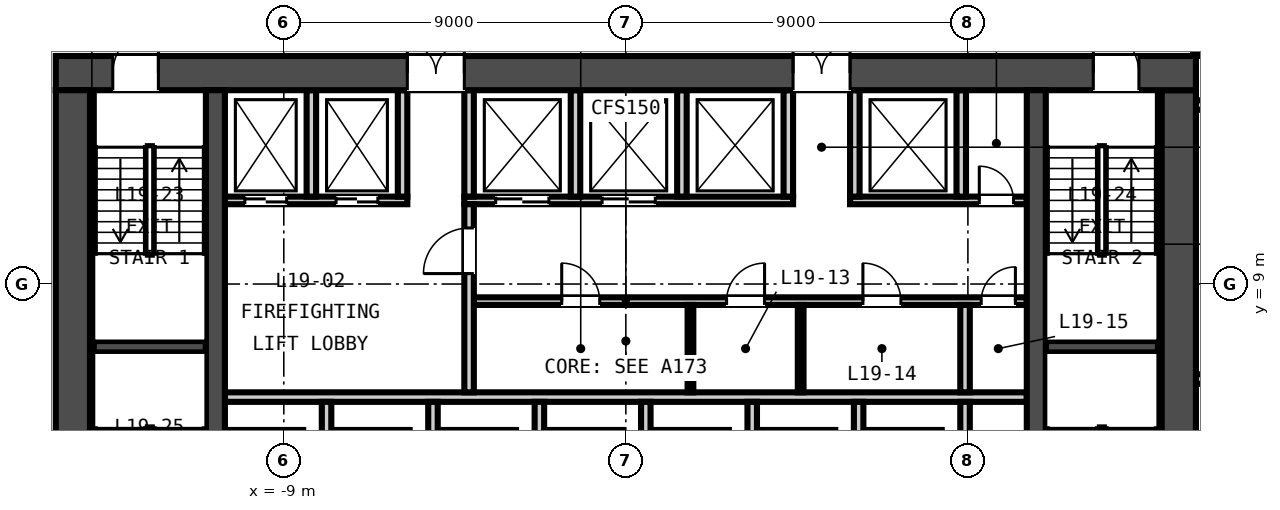
"""IFC4 building model, lengths in metres.
Left out: names, types, materials, properties, quantities, classifications, styles, units other than length and angle.
Written with IfcOpenShell. Run it as: python <this file> out.ifc"""

import sys

from ifc_helpers import new_model, si_unit, direction, frame, frame_2d, origin, place, context, subcontext, project, spatial, rectangle, extrude, element, fill, save


model = new_model("IFC4")
c1 = context("Model", 3, precision=1e-05, world=origin(), true_north=direction((0.0, 1.0)))
c2 = subcontext(c1, "Body", "Model", "MODEL_VIEW")
j1 = project(units=[si_unit("LENGTHUNIT", "METRE"), si_unit("PLANEANGLEUNIT", "RADIAN")], contexts=[c1])
p1 = place(None, origin())
s1 = spatial("IfcSite", under=j1, at=p1, CompositionType="ELEMENT")
p2 = place(p1, origin())
s2 = spatial("IfcBuilding", under=s1, at=p2, CompositionType="ELEMENT")
p3 = place(p2, frame((0.0, 0.0, 84.3)))
s3 = spatial("IfcBuildingStorey", under=s2, at=p3, CompositionType="ELEMENT", Elevation=84.3)
p4 = place(p3, frame((-15.0, 14.55, -0.15), z_axis=(0.0, 0.0, 1.0), x_axis=(1.0, 0.0, 0.0)))
e1 = element("IfcWall", 1, at=p4, inside=s3, PredefinedType="SOLIDWALL", context=c2, shape_type="SweptSolid", body=[
    extrude(rectangle(XDim=30.0, YDim=0.9, at=frame_2d((15.0, 0.0))), origin(), (0.0, 0.0, 1.0), 3.65),
])
p5 = place(p4, frame((9.25, 0.0, 0.15)))
e2 = element("IfcOpeningElement", 2, at=p5, cuts=e1, PredefinedType="OPENING", context=c2, shape_type="SweptSolid", body=[
    extrude(rectangle(XDim=1.5, YDim=2.1, at=frame_2d((0.75, 1.05))), frame((0.0, 0.46, 0.0), z_axis=(0.0, -1.0, 0.0), x_axis=(1.0, 0.0, 0.0)), (0.0, 0.0, 1.0), 0.92),
])
p6 = place(p4, frame((19.4, 0.0, 0.15)))
e3 = element("IfcOpeningElement", 3, at=p6, cuts=e1, PredefinedType="OPENING", context=c2, shape_type="SweptSolid", body=[
    extrude(rectangle(XDim=1.5, YDim=2.1, at=frame_2d((0.75, 1.05))), frame((0.0, 0.46, 0.0), z_axis=(0.0, -1.0, 0.0), x_axis=(1.0, 0.0, 0.0)), (0.0, 0.0, 1.0), 0.92),
])
p7 = place(p4, frame((1.5, 0.0, 0.15)))
e4 = element("IfcOpeningElement", 4, at=p7, cuts=e1, PredefinedType="OPENING", context=c2, shape_type="SweptSolid", body=[
    extrude(rectangle(XDim=1.2, YDim=2.1, at=frame_2d((0.6, 1.05))), frame((0.0, 0.46, 0.0), z_axis=(0.0, -1.0, 0.0), x_axis=(1.0, 0.0, 0.0)), (0.0, 0.0, 1.0), 0.92),
])
p8 = place(p4, frame((27.3, 0.0, 0.15)))
e5 = element("IfcOpeningElement", 5, at=p8, cuts=e1, PredefinedType="OPENING", context=c2, shape_type="SweptSolid", body=[
    extrude(rectangle(XDim=1.2, YDim=2.1, at=frame_2d((0.6, 1.05))), frame((0.0, 0.46, 0.0), z_axis=(0.0, -1.0, 0.0), x_axis=(1.0, 0.0, 0.0)), (0.0, 0.0, 1.0), 0.92),
])
for number, where, z_axis, x_axis in (
    (6, (-14.55, 0.9, -0.15), (0.0, 0.0, 1.0), (0.0, 1.0, 0.0)),
    (7, (14.55, 0.9, -0.15), (0.0, 0.0, 1.0), (0.0, 1.0, 0.0)),
):
    element("IfcWall", number, at=place(p3, frame(where, z_axis=z_axis, x_axis=x_axis)), inside=s3, PredefinedType="SOLIDWALL", context=c2, shape_type="SweptSolid", body=[
        extrude(rectangle(XDim=13.2, YDim=0.9, at=frame_2d((6.6, 0.0))), origin(), (0.0, 0.0, 1.0), 3.65),
    ])
for number, where, z_axis, x_axis in (
    (8, (-10.8, 0.9, -0.15), (0.0, 0.0, 1.0), (0.0, 1.0, 0.0)),
    (9, (10.8, 0.9, -0.15), (0.0, 0.0, 1.0), (0.0, 1.0, 0.0)),
):
    element("IfcWall", number, at=place(p3, frame(where, z_axis=z_axis, x_axis=x_axis)), inside=s3, PredefinedType="SOLIDWALL", context=c2, shape_type="SweptSolid", body=[
        extrude(rectangle(XDim=13.2, YDim=0.5, at=frame_2d((6.6, 0.0))), origin(), (0.0, 0.0, 1.0), 3.65),
    ])
p9 = place(p3, frame((-10.55, 6.025, 0.0), z_axis=(0.0, 0.0, 1.0), x_axis=(1.0, 0.0, 0.0)))
e10 = element("IfcWall", 10, at=p9, inside=s3, PredefinedType="PARTITIONING", context=c2, shape_type="SweptSolid", body=[
    extrude(rectangle(XDim=21.1, YDim=0.25, at=frame_2d((10.55, 0.0))), origin(), (0.0, 0.0, 1.0), 3.5),
])
p10 = place(p3, frame((-4.125, 8.55, 0.0), z_axis=(0.0, 0.0, 1.0), x_axis=(1.0, 0.0, 0.0)))
e11 = element("IfcWall", 11, at=p10, inside=s3, PredefinedType="PARTITIONING", context=c2, shape_type="SweptSolid", body=[
    extrude(rectangle(XDim=14.675, YDim=0.2, at=frame_2d((7.337, 0.0))), origin(), (0.0, 0.0, 1.0), 3.5),
])
p11 = place(p10, frame((2.438, 0.0, 0.0)))
e12 = element("IfcOpeningElement", 12, at=p11, cuts=e11, PredefinedType="OPENING", context=c2, shape_type="SweptSolid", body=[
    extrude(rectangle(XDim=1.0, YDim=2.1, at=frame_2d((0.5, 1.05))), frame((0.0, 0.11, 0.0), z_axis=(0.0, -1.0, 0.0), x_axis=(1.0, 0.0, 0.0)), (0.0, 0.0, 1.0), 0.22),
])
p12 = place(p10, frame((6.775, 0.0, 0.0)))
e13 = element("IfcOpeningElement", 13, at=p12, cuts=e11, PredefinedType="OPENING", context=c2, shape_type="SweptSolid", body=[
    extrude(rectangle(XDim=1.0, YDim=2.1, at=frame_2d((0.5, 1.05))), frame((0.0, 0.11, 0.0), z_axis=(0.0, -1.0, 0.0), x_axis=(1.0, 0.0, 0.0)), (0.0, 0.0, 1.0), 0.22),
])
p13 = place(p10, frame((10.363, 0.0, 0.0)))
e14 = element("IfcOpeningElement", 14, at=p13, cuts=e11, PredefinedType="OPENING", context=c2, shape_type="SweptSolid", body=[
    extrude(rectangle(XDim=1.0, YDim=2.1, at=frame_2d((0.5, 1.05))), frame((0.0, 0.11, 0.0), z_axis=(0.0, -1.0, 0.0), x_axis=(1.0, 0.0, 0.0)), (0.0, 0.0, 1.0), 0.22),
])
p14 = place(p10, frame((13.475, 0.0, 0.0)))
e15 = element("IfcOpeningElement", 15, at=p14, cuts=e11, PredefinedType="OPENING", context=c2, shape_type="SweptSolid", body=[
    extrude(rectangle(XDim=0.9, YDim=2.1, at=frame_2d((0.45, 1.05))), frame((0.0, 0.11, 0.0), z_axis=(0.0, -1.0, 0.0), x_axis=(1.0, 0.0, 0.0)), (0.0, 0.0, 1.0), 0.22),
])
p15 = place(p3, frame((-10.55, 11.2, 0.0), z_axis=(0.0, 0.0, 1.0), x_axis=(1.0, 0.0, 0.0)))
e16 = element("IfcWall", 16, at=p15, inside=s3, PredefinedType="PARTITIONING", context=c2, shape_type="SweptSolid", body=[
    extrude(rectangle(XDim=4.8, YDim=0.2, at=frame_2d((2.4, 0.0))), origin(), (0.0, 0.0, 1.0), 3.5),
])
p16 = place(p15, frame((0.525, 0.0, 0.0)))
e17 = element("IfcOpeningElement", 17, at=p16, cuts=e16, PredefinedType="OPENING", context=c2, shape_type="SweptSolid", body=[
    extrude(rectangle(XDim=1.1, YDim=2.1, at=frame_2d((0.55, 1.05))), frame((0.0, 0.11, 0.0), z_axis=(0.0, -1.0, 0.0), x_axis=(1.0, 0.0, 0.0)), (0.0, 0.0, 1.0), 0.22),
])
p17 = place(p15, frame((2.925, 0.0, 0.0)))
e18 = element("IfcOpeningElement", 18, at=p17, cuts=e16, PredefinedType="OPENING", context=c2, shape_type="SweptSolid", body=[
    extrude(rectangle(XDim=1.1, YDim=2.1, at=frame_2d((0.55, 1.05))), frame((0.0, 0.11, 0.0), z_axis=(0.0, -1.0, 0.0), x_axis=(1.0, 0.0, 0.0)), (0.0, 0.0, 1.0), 0.22),
])
p18 = place(p3, frame((-4.25, 11.2, 0.0), z_axis=(0.0, 0.0, 1.0), x_axis=(1.0, 0.0, 0.0)))
e19 = element("IfcWall", 19, at=p18, inside=s3, PredefinedType="PARTITIONING", context=c2, shape_type="SweptSolid", body=[
    extrude(rectangle(XDim=8.65, YDim=0.2, at=frame_2d((4.325, 0.0))), origin(), (0.0, 0.0, 1.0), 3.5),
])
p19 = place(p18, frame((0.825, 0.0, 0.0)))
e20 = element("IfcOpeningElement", 20, at=p19, cuts=e19, PredefinedType="OPENING", context=c2, shape_type="SweptSolid", body=[
    extrude(rectangle(XDim=1.4, YDim=2.1, at=frame_2d((0.7, 1.05))), frame((0.0, 0.11, 0.0), z_axis=(0.0, -1.0, 0.0), x_axis=(1.0, 0.0, 0.0)), (0.0, 0.0, 1.0), 0.22),
])
p20 = place(p18, frame((3.625, 0.0, 0.0)))
e21 = element("IfcOpeningElement", 21, at=p20, cuts=e19, PredefinedType="OPENING", context=c2, shape_type="SweptSolid", body=[
    extrude(rectangle(XDim=1.4, YDim=2.1, at=frame_2d((0.7, 1.05))), frame((0.0, 0.11, 0.0), z_axis=(0.0, -1.0, 0.0), x_axis=(1.0, 0.0, 0.0)), (0.0, 0.0, 1.0), 0.22),
])
p21 = place(p3, frame((5.9, 11.2, 0.0), z_axis=(0.0, 0.0, 1.0), x_axis=(1.0, 0.0, 0.0)))
e22 = element("IfcWall", 22, at=p21, inside=s3, PredefinedType="PARTITIONING", context=c2, shape_type="SweptSolid", body=[
    extrude(rectangle(XDim=4.65, YDim=0.2, at=frame_2d((2.325, 0.0))), origin(), (0.0, 0.0, 1.0), 3.5),
])
p22 = place(p21, frame((3.4, 0.0, 0.0)))
e23 = element("IfcOpeningElement", 23, at=p22, cuts=e22, PredefinedType="OPENING", context=c2, shape_type="SweptSolid", body=[
    extrude(rectangle(XDim=0.9, YDim=2.1, at=frame_2d((0.45, 1.05))), frame((0.0, 0.11, 0.0), z_axis=(0.0, -1.0, 0.0), x_axis=(1.0, 0.0, 0.0)), (0.0, 0.0, 1.0), 0.22),
])
p23 = place(p3, frame((-4.125, 6.15, 0.0), z_axis=(0.0, 0.0, 1.0), x_axis=(0.0, 1.0, 0.0)))
e24 = element("IfcWall", 24, at=p23, inside=s3, PredefinedType="PARTITIONING", context=c2, shape_type="SweptSolid", body=[
    extrude(rectangle(XDim=4.95, YDim=0.25, at=frame_2d((2.475, 0.0))), origin(), (0.0, 0.0, 1.0), 3.5),
])
p24 = place(p23, frame((3.125, 0.0, 0.0)))
e25 = element("IfcOpeningElement", 25, at=p24, cuts=e24, PredefinedType="OPENING", context=c2, shape_type="SweptSolid", body=[
    extrude(rectangle(XDim=1.2, YDim=2.1, at=frame_2d((0.6, 1.05))), frame((0.0, 0.135, 0.0), z_axis=(0.0, -1.0, 0.0), x_axis=(1.0, 0.0, 0.0)), (0.0, 0.0, 1.0), 0.27),
])
for number, where, z_axis, x_axis in (
    (26, (-7.875, 3.6, 0.0), (0.0, 0.0, 1.0), (0.0, 1.0, 0.0)),
    (27, (-5.075, 3.6, 0.0), (0.0, 0.0, 1.0), (0.0, 1.0, 0.0)),
    (28, (-2.275, 3.6, 0.0), (0.0, 0.0, 1.0), (0.0, 1.0, 0.0)),
    (29, (0.525, 3.6, 0.0), (0.0, 0.0, 1.0), (0.0, 1.0, 0.0)),
    (30, (3.325, 3.6, 0.0), (0.0, 0.0, 1.0), (0.0, 1.0, 0.0)),
    (31, (6.125, 3.6, 0.0), (0.0, 0.0, 1.0), (0.0, 1.0, 0.0)),
    (32, (8.925, 3.6, 0.0), (0.0, 0.0, 1.0), (0.0, 1.0, 0.0)),
):
    element("IfcWall", number, at=place(p3, frame(where, z_axis=z_axis, x_axis=x_axis)), inside=s3, PredefinedType="PARTITIONING", context=c2, shape_type="SweptSolid", body=[
        extrude(rectangle(XDim=2.3, YDim=0.25, at=frame_2d((1.15, 0.0))), origin(), (0.0, 0.0, 1.0), 3.5),
    ])
for number, where, z_axis, x_axis in (
    (33, (1.7, 6.15, 0.0), (0.0, 0.0, 1.0), (0.0, 1.0, 0.0)),
    (34, (4.6, 6.15, 0.0), (0.0, 0.0, 1.0), (0.0, 1.0, 0.0)),
):
    element("IfcWall", number, at=place(p3, frame(where, z_axis=z_axis, x_axis=x_axis)), inside=s3, PredefinedType="PARTITIONING", context=c2, shape_type="SweptSolid", body=[
        extrude(rectangle(XDim=2.3, YDim=0.15, at=frame_2d((1.15, 0.0))), origin(), (0.0, 0.0, 1.0), 3.5),
    ])
p25 = place(p3, frame((8.925, 6.15, 0.0), z_axis=(0.0, 0.0, 1.0), x_axis=(0.0, 1.0, 0.0)))
e35 = element("IfcWall", 35, at=p25, inside=s3, PredefinedType="PARTITIONING", context=c2, shape_type="SweptSolid", body=[
    extrude(rectangle(XDim=2.3, YDim=0.25, at=frame_2d((1.15, 0.0))), origin(), (0.0, 0.0, 1.0), 3.5),
])
for number, where, z_axis, x_axis in (
    (36, (-8.275, 11.3, 0.0), (0.0, 0.0, 1.0), (0.0, 1.0, 0.0)),
    (37, (-5.875, 11.3, 0.0), (0.0, 0.0, 1.0), (0.0, 1.0, 0.0)),
    (38, (-4.125, 11.3, 0.0), (0.0, 0.0, 1.0), (0.0, 1.0, 0.0)),
    (39, (-1.325, 11.3, 0.0), (0.0, 0.0, 1.0), (0.0, 1.0, 0.0)),
    (40, (1.475, 11.3, 0.0), (0.0, 0.0, 1.0), (0.0, 1.0, 0.0)),
    (41, (4.275, 11.3, 0.0), (0.0, 0.0, 1.0), (0.0, 1.0, 0.0)),
    (42, (6.025, 11.3, 0.0), (0.0, 0.0, 1.0), (0.0, 1.0, 0.0)),
    (43, (8.825, 11.3, 0.0), (0.0, 0.0, 1.0), (0.0, 1.0, 0.0)),
):
    element("IfcWall", number, at=place(p3, frame(where, z_axis=z_axis, x_axis=x_axis)), inside=s3, PredefinedType="PARTITIONING", context=c2, shape_type="SweptSolid", body=[
        extrude(rectangle(XDim=2.8, YDim=0.25, at=frame_2d((1.4, 0.0))), origin(), (0.0, 0.0, 1.0), 3.5),
    ])
p26 = place(p3, frame((-14.0, 7.35, 0.0), z_axis=(0.0, 0.0, 1.0), x_axis=(1.0, 0.0, 0.0)))
e44 = element("IfcWall", 44, at=p26, inside=s3, PredefinedType="SOLIDWALL", context=c2, shape_type="SweptSolid", body=[
    extrude(rectangle(XDim=2.95, YDim=0.3, at=frame_2d((1.475, 0.0))), origin(), (0.0, 0.0, 1.0), 3.5),
])
p27 = place(p3, frame((-14.05, 0.9, 0.0), z_axis=(0.0, 0.0, 1.0), x_axis=(0.0, 1.0, 0.0)))
e45 = element("IfcWall", 45, at=p27, inside=s3, PredefinedType="SOLIDWALL", context=c2, shape_type="SweptSolid", body=[
    extrude(rectangle(XDim=13.2, YDim=0.1, at=frame_2d((6.6, 0.0))), origin(), (0.0, 0.0, 1.0), 3.5),
])
p28 = place(p3, frame((11.05, 7.35, 0.0), z_axis=(0.0, 0.0, 1.0), x_axis=(1.0, 0.0, 0.0)))
e46 = element("IfcWall", 46, at=p28, inside=s3, PredefinedType="SOLIDWALL", context=c2, shape_type="SweptSolid", body=[
    extrude(rectangle(XDim=2.95, YDim=0.3, at=frame_2d((1.475, 0.0))), origin(), (0.0, 0.0, 1.0), 3.5),
])
p29 = place(p3, frame((14.05, 0.9, 0.0), z_axis=(0.0, 0.0, 1.0), x_axis=(0.0, 1.0, 0.0)))
e47 = element("IfcWall", 47, at=p29, inside=s3, PredefinedType="SOLIDWALL", context=c2, shape_type="SweptSolid", body=[
    extrude(rectangle(XDim=13.2, YDim=0.1, at=frame_2d((6.6, 0.0))), origin(), (0.0, 0.0, 1.0), 3.5),
])
p30 = place(p3, frame((15.0, 16.967, 0.0), z_axis=(0.0, 0.0, 1.0), x_axis=(0.0, -1.0, 0.0)))
e48 = element("IfcWall", 48, at=p30, inside=s3, PredefinedType="PARTITIONING", context=c2, shape_type="SweptSolid", body=[
    extrude(rectangle(XDim=1.967, YDim=0.15, at=frame_2d((0.983, 0.0))), origin(), (0.0, 0.0, 1.0), 2.741),
])
p31 = place(p30, frame((0.483, 0.0, 0.0)))
e49 = element("IfcOpeningElement", 49, at=p31, cuts=e48, PredefinedType="OPENING", context=c2, shape_type="SweptSolid", body=[
    extrude(rectangle(XDim=1.0, YDim=2.1, at=frame_2d((0.5, 1.05))), frame((0.0, 0.085, 0.0), z_axis=(0.0, -1.0, 0.0), x_axis=(1.0, 0.0, 0.0)), (0.0, 0.0, 1.0), 0.17),
])
p32 = place(p3, frame((15.0, 13.709, 0.0), z_axis=(0.0, 0.0, 1.0), x_axis=(1.0, 0.0, 0.0)))
e50 = element("IfcWall", 50, at=p32, inside=s3, PredefinedType="PARTITIONING", context=c2, shape_type="SweptSolid", body=[
    extrude(rectangle(XDim=13.668, YDim=0.25, at=frame_2d((6.834, 0.0))), origin(), (0.0, 0.0, 1.0), 2.741),
])
p33 = place(p3, frame((15.0, 6.5, 0.0), z_axis=(0.0, 0.0, 1.0), x_axis=(1.0, 0.0, 0.0)))
e51 = element("IfcWall", 51, at=p33, inside=s3, PredefinedType="PARTITIONING", context=c2, shape_type="SweptSolid", body=[
    extrude(rectangle(XDim=3.275, YDim=0.25, at=frame_2d((1.637, 0.0))), origin(), (0.0, 0.0, 1.0), 2.741),
])
p34 = place(p24, origin())
e52 = element("IfcDoor", 52, at=p34, inside=s3, OperationType="SINGLE_SWING_LEFT", PredefinedType="DOOR", context=c2, shape_type="SweptSolid", body=[
    extrude(rectangle(XDim=1.2, YDim=2.1, at=frame_2d((0.6, 1.05))), frame((0.0, 0.025, 0.0), z_axis=(0.0, -1.0, 0.0), x_axis=(1.0, 0.0, 0.0)), (0.0, 0.0, 1.0), 0.05),
])
fill(e25, e52)
p35 = place(p11, origin())
e53 = element("IfcDoor", 53, at=p35, inside=s3, OperationType="SINGLE_SWING_LEFT", PredefinedType="DOOR", context=c2, shape_type="SweptSolid", body=[
    extrude(rectangle(XDim=1.0, YDim=2.1, at=frame_2d((0.5, 1.05))), frame((0.0, 0.025, 0.0), z_axis=(0.0, -1.0, 0.0), x_axis=(1.0, 0.0, 0.0)), (0.0, 0.0, 1.0), 0.05),
])
fill(e12, e53)
p36 = place(p12, origin())
e54 = element("IfcDoor", 54, at=p36, inside=s3, OperationType="SINGLE_SWING_RIGHT", PredefinedType="DOOR", context=c2, shape_type="SweptSolid", body=[
    extrude(rectangle(XDim=1.0, YDim=2.1, at=frame_2d((0.5, 1.05))), frame((0.0, 0.025, 0.0), z_axis=(0.0, -1.0, 0.0), x_axis=(1.0, 0.0, 0.0)), (0.0, 0.0, 1.0), 0.05),
])
fill(e13, e54)
p37 = place(p13, origin())
e55 = element("IfcDoor", 55, at=p37, inside=s3, OperationType="SINGLE_SWING_LEFT", PredefinedType="DOOR", context=c2, shape_type="SweptSolid", body=[
    extrude(rectangle(XDim=1.0, YDim=2.1, at=frame_2d((0.5, 1.05))), frame((0.0, 0.025, 0.0), z_axis=(0.0, -1.0, 0.0), x_axis=(1.0, 0.0, 0.0)), (0.0, 0.0, 1.0), 0.05),
])
fill(e14, e55)
p38 = place(p14, origin())
e56 = element("IfcDoor", 56, at=p38, inside=s3, OperationType="SINGLE_SWING_RIGHT", PredefinedType="DOOR", context=c2, shape_type="SweptSolid", body=[
    extrude(rectangle(XDim=0.9, YDim=2.1, at=frame_2d((0.45, 1.05))), frame((0.0, 0.025, 0.0), z_axis=(0.0, -1.0, 0.0), x_axis=(1.0, 0.0, 0.0)), (0.0, 0.0, 1.0), 0.05),
])
fill(e15, e56)
p39 = place(p16, origin())
e57 = element("IfcDoor", 57, at=p39, inside=s3, OperationType="DOUBLE_DOOR_SLIDING", PredefinedType="DOOR", context=c2, shape_type="SweptSolid", body=[
    extrude(rectangle(XDim=1.1, YDim=2.1, at=frame_2d((0.55, 1.05))), frame((0.0, 0.025, 0.0), z_axis=(0.0, -1.0, 0.0), x_axis=(1.0, 0.0, 0.0)), (0.0, 0.0, 1.0), 0.05),
])
fill(e17, e57)
p40 = place(p17, origin())
e58 = element("IfcDoor", 58, at=p40, inside=s3, OperationType="DOUBLE_DOOR_SLIDING", PredefinedType="DOOR", context=c2, shape_type="SweptSolid", body=[
    extrude(rectangle(XDim=1.1, YDim=2.1, at=frame_2d((0.55, 1.05))), frame((0.0, 0.025, 0.0), z_axis=(0.0, -1.0, 0.0), x_axis=(1.0, 0.0, 0.0)), (0.0, 0.0, 1.0), 0.05),
])
fill(e18, e58)
p41 = place(p19, origin())
e59 = element("IfcDoor", 59, at=p41, inside=s3, OperationType="DOUBLE_DOOR_SLIDING", PredefinedType="DOOR", context=c2, shape_type="SweptSolid", body=[
    extrude(rectangle(XDim=1.4, YDim=2.1, at=frame_2d((0.7, 1.05))), frame((0.0, 0.025, 0.0), z_axis=(0.0, -1.0, 0.0), x_axis=(1.0, 0.0, 0.0)), (0.0, 0.0, 1.0), 0.05),
])
fill(e20, e59)
p42 = place(p20, origin())
e60 = element("IfcDoor", 60, at=p42, inside=s3, OperationType="DOUBLE_DOOR_SLIDING", PredefinedType="DOOR", context=c2, shape_type="SweptSolid", body=[
    extrude(rectangle(XDim=1.4, YDim=2.1, at=frame_2d((0.7, 1.05))), frame((0.0, 0.025, 0.0), z_axis=(0.0, -1.0, 0.0), x_axis=(1.0, 0.0, 0.0)), (0.0, 0.0, 1.0), 0.05),
])
fill(e21, e60)
p43 = place(p22, origin())
e61 = element("IfcDoor", 61, at=p43, inside=s3, OperationType="SINGLE_SWING_LEFT", PredefinedType="DOOR", context=c2, shape_type="SweptSolid", body=[
    extrude(rectangle(XDim=0.9, YDim=2.1, at=frame_2d((0.45, 1.05))), frame((0.0, 0.025, 0.0), z_axis=(0.0, -1.0, 0.0), x_axis=(1.0, 0.0, 0.0)), (0.0, 0.0, 1.0), 0.05),
])
fill(e23, e61)
p44 = place(p5, origin())
e62 = element("IfcDoor", 62, at=p44, inside=s3, OperationType="DOUBLE_DOOR_SINGLE_SWING", PredefinedType="DOOR", context=c2, shape_type="SweptSolid", body=[
    extrude(rectangle(XDim=1.5, YDim=2.1, at=frame_2d((0.75, 1.05))), frame((0.0, 0.025, 0.0), z_axis=(0.0, -1.0, 0.0), x_axis=(1.0, 0.0, 0.0)), (0.0, 0.0, 1.0), 0.05),
])
fill(e2, e62)
p45 = place(p6, origin())
e63 = element("IfcDoor", 63, at=p45, inside=s3, OperationType="DOUBLE_DOOR_SINGLE_SWING", PredefinedType="DOOR", context=c2, shape_type="SweptSolid", body=[
    extrude(rectangle(XDim=1.5, YDim=2.1, at=frame_2d((0.75, 1.05))), frame((0.0, 0.025, 0.0), z_axis=(0.0, -1.0, 0.0), x_axis=(1.0, 0.0, 0.0)), (0.0, 0.0, 1.0), 0.05),
])
fill(e3, e63)
p46 = place(p7, origin())
e64 = element("IfcDoor", 64, at=p46, inside=s3, OperationType="SINGLE_SWING_RIGHT", PredefinedType="DOOR", context=c2, shape_type="SweptSolid", body=[
    extrude(rectangle(XDim=1.2, YDim=2.1, at=frame_2d((0.6, 1.05))), frame((0.0, 0.025, 0.0), z_axis=(0.0, -1.0, 0.0), x_axis=(1.0, 0.0, 0.0)), (0.0, 0.0, 1.0), 0.05),
])
fill(e4, e64)
p47 = place(p8, origin())
e65 = element("IfcDoor", 65, at=p47, inside=s3, OperationType="SINGLE_SWING_LEFT", PredefinedType="DOOR", context=c2, shape_type="SweptSolid", body=[
    extrude(rectangle(XDim=1.2, YDim=2.1, at=frame_2d((0.6, 1.05))), frame((0.0, 0.025, 0.0), z_axis=(0.0, -1.0, 0.0), x_axis=(1.0, 0.0, 0.0)), (0.0, 0.0, 1.0), 0.05),
])
fill(e5, e65)
save(model, sys.argv[1])
